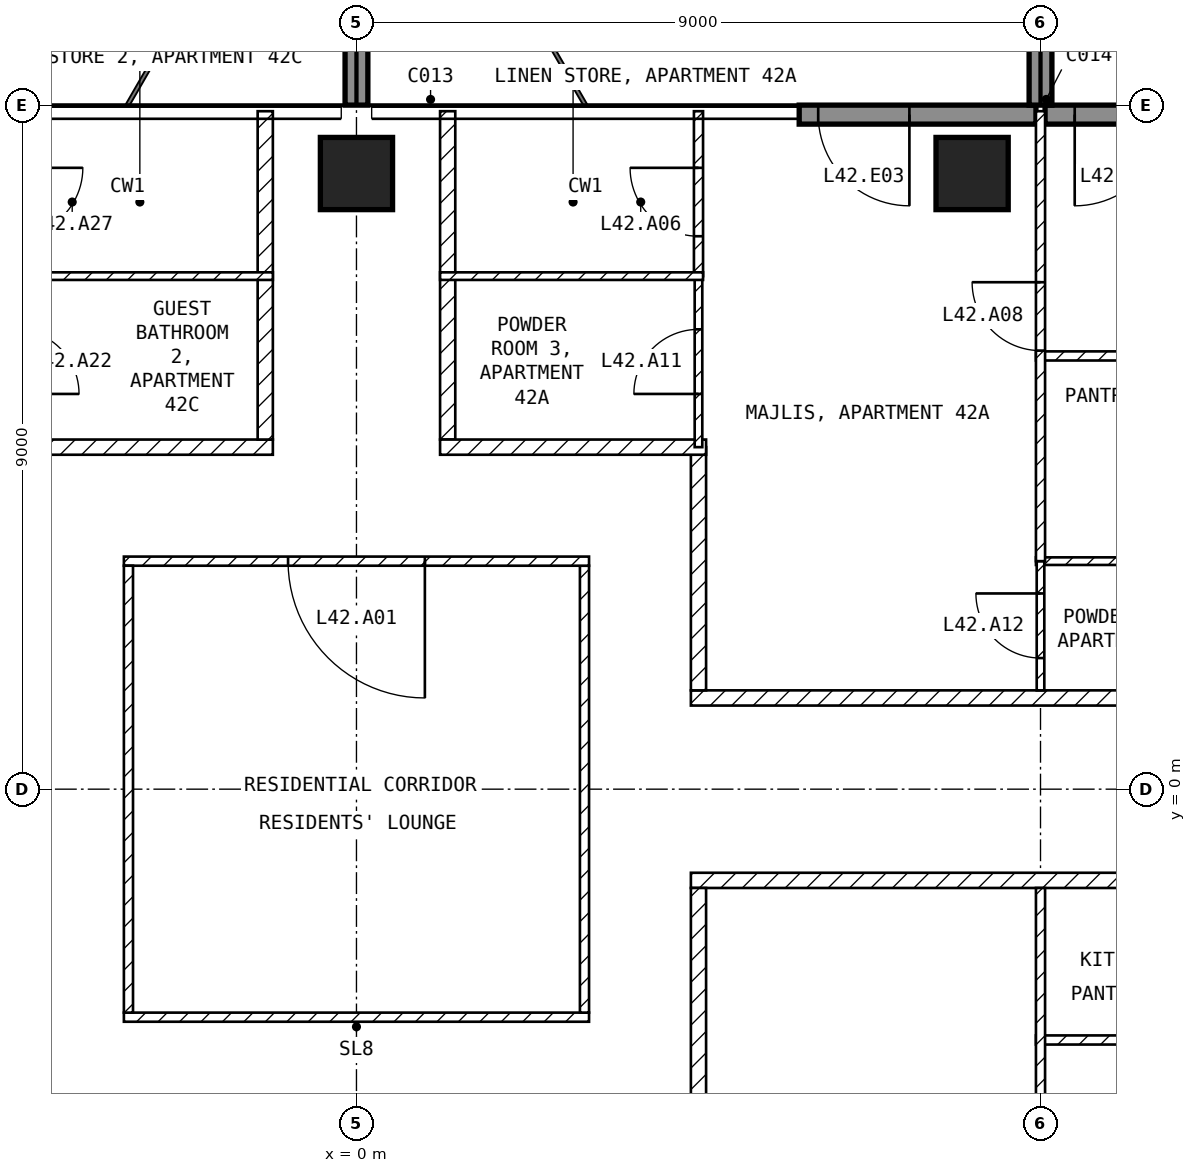
"""IFC4 building model, lengths in metres.
Left out: names, types, materials, properties, quantities, classifications, styles, units other than length and angle.
Written with IfcOpenShell. Run it as: python <this file> out.ifc"""

import sys

from ifc_helpers import new_model, si_unit, direction, frame, frame_2d, origin, origin_2d, place, context, subcontext, project, spatial, rectangle, extrude, element, fill, save


model = new_model("IFC4")
c1 = context("Model", 3, precision=1e-05, world=origin(), true_north=direction((0.0, 1.0)))
c2 = subcontext(c1, "Body", "Model", "MODEL_VIEW")
j1 = project(units=[si_unit("LENGTHUNIT", "METRE"), si_unit("PLANEANGLEUNIT", "RADIAN")], contexts=[c1])
p1 = place(None, origin())
s1 = spatial("IfcSite", under=j1, at=p1, CompositionType="ELEMENT")
p2 = place(p1, origin())
s2 = spatial("IfcBuilding", under=s1, at=p2, CompositionType="ELEMENT")
p3 = place(p2, frame((0.0, 0.0, 173.6)))
s3 = spatial("IfcBuildingStorey", under=s2, at=p3, CompositionType="ELEMENT", Elevation=173.6)
for number, where, z_axis, x_axis in (
    (1, (0.0, 8.1, -0.25), (0.0, 0.0, 1.0), (1.0, 0.0, 0.0)),
    (2, (8.1, 8.1, -0.25), (0.0, 0.0, 1.0), (1.0, 0.0, 0.0)),
):
    element("IfcColumn", number, at=place(p3, frame(where, z_axis=z_axis, x_axis=x_axis)), inside=s3, PredefinedType="COLUMN", context=c2, shape_type="SweptSolid", body=[
        extrude(rectangle(XDim=0.95, YDim=0.95, at=origin_2d()), origin(), (0.0, 0.0, 1.0), 3.5),
    ])
p4 = place(p3, frame((10.9, 8.875, 0.0), z_axis=(0.0, 0.0, 1.0), x_axis=(-1.0, 0.0, 0.0)))
e3 = element("IfcWall", 3, at=p4, inside=s3, PredefinedType="SOLIDWALL", context=c2, shape_type="SweptSolid", body=[
    extrude(rectangle(XDim=1.84, YDim=0.25, at=frame_2d((0.92, 0.0))), origin(), (0.0, 0.0, 1.0), 3.25),
])
p5 = place(p4, frame((0.25, 0.0, 0.0)))
e4 = element("IfcOpeningElement", 4, at=p5, cuts=e3, PredefinedType="OPENING", context=c2, shape_type="SweptSolid", body=[
    extrude(rectangle(XDim=1.2, YDim=2.4, at=frame_2d((0.6, 1.2))), frame((0.0, 0.135, 0.0), z_axis=(0.0, -1.0, 0.0), x_axis=(1.0, 0.0, 0.0)), (0.0, 0.0, 1.0), 0.27),
])
p6 = place(p3, frame((8.94, 8.875, 0.0), z_axis=(0.0, 0.0, 1.0), x_axis=(-1.0, 0.0, 0.0)))
e5 = element("IfcWall", 5, at=p6, inside=s3, PredefinedType="SOLIDWALL", context=c2, shape_type="SweptSolid", body=[
    extrude(rectangle(XDim=3.115, YDim=0.25, at=frame_2d((1.558, 0.0))), origin(), (0.0, 0.0, 1.0), 3.25),
])
p7 = place(p6, frame((1.665, 0.0, 0.0)))
e6 = element("IfcOpeningElement", 6, at=p7, cuts=e5, PredefinedType="OPENING", context=c2, shape_type="SweptSolid", body=[
    extrude(rectangle(XDim=1.2, YDim=2.4, at=frame_2d((0.6, 1.2))), frame((0.0, 0.135, 0.0), z_axis=(0.0, -1.0, 0.0), x_axis=(1.0, 0.0, 0.0)), (0.0, 0.0, 1.0), 0.27),
])
for number, where, z_axis, x_axis in (
    (7, (0.0, 9.0, 0.0), (0.0, 0.0, 1.0), (0.0, 1.0, 0.0)),
    (8, (9.0, 9.0, 0.0), (0.0, 0.0, 1.0), (0.0, 1.0, 0.0)),
):
    element("IfcWall", number, at=place(p3, frame(where, z_axis=z_axis, x_axis=x_axis)), inside=s3, PredefinedType="SOLIDWALL", context=c2, shape_type="SweptSolid", body=[
        extrude(rectangle(XDim=2.7, YDim=0.3, at=frame_2d((1.35, 0.0))), origin(), (0.0, 0.0, 1.0), 3.25),
    ])
p8 = place(p3, frame((-3.06, -3.0, 0.0), z_axis=(0.0, 0.0, 1.0), x_axis=(1.0, 0.0, 0.0)))
e9 = element("IfcWall", 9, at=p8, inside=s3, PredefinedType="PARTITIONING", context=c2, shape_type="SweptSolid", body=[
    extrude(rectangle(XDim=6.12, YDim=0.12, at=frame_2d((3.06, 0.0))), origin(), (0.0, 0.0, 1.0), 3.25),
])
p9 = place(p3, frame((3.0, -2.94, 0.0), z_axis=(0.0, 0.0, 1.0), x_axis=(0.0, 1.0, 0.0)))
e10 = element("IfcWall", 10, at=p9, inside=s3, PredefinedType="PARTITIONING", context=c2, shape_type="SweptSolid", body=[
    extrude(rectangle(XDim=5.88, YDim=0.12, at=frame_2d((2.94, 0.0))), origin(), (0.0, 0.0, 1.0), 3.25),
])
p10 = place(p3, frame((3.06, 3.0, 0.0), z_axis=(0.0, 0.0, 1.0), x_axis=(-1.0, 0.0, 0.0)))
e11 = element("IfcWall", 11, at=p10, inside=s3, PredefinedType="PARTITIONING", context=c2, shape_type="SweptSolid", body=[
    extrude(rectangle(XDim=6.12, YDim=0.12, at=frame_2d((3.06, 0.0))), origin(), (0.0, 0.0, 1.0), 3.25),
])
p11 = place(p10, frame((2.16, 0.0, 0.0)))
e12 = element("IfcOpeningElement", 12, at=p11, cuts=e11, PredefinedType="OPENING", context=c2, shape_type="SweptSolid", body=[
    extrude(rectangle(XDim=1.8, YDim=2.1, at=frame_2d((0.9, 1.05))), frame((0.0, 0.07, 0.0), z_axis=(0.0, -1.0, 0.0), x_axis=(1.0, 0.0, 0.0)), (0.0, 0.0, 1.0), 0.14),
])
p12 = place(p3, frame((-3.0, 2.94, 0.0), z_axis=(0.0, 0.0, 1.0), x_axis=(0.0, -1.0, 0.0)))
e13 = element("IfcWall", 13, at=p12, inside=s3, PredefinedType="PARTITIONING", context=c2, shape_type="SweptSolid", body=[
    extrude(rectangle(XDim=5.88, YDim=0.12, at=frame_2d((2.94, 0.0))), origin(), (0.0, 0.0, 1.0), 3.25),
])
p13 = place(p3, frame((4.4, 1.2, 0.0), z_axis=(0.0, 0.0, 1.0), x_axis=(1.0, 0.0, 0.0)))
e14 = element("IfcWall", 14, at=p13, inside=s3, PredefinedType="PARTITIONING", context=c2, shape_type="SweptSolid", body=[
    extrude(rectangle(XDim=17.2, YDim=0.2, at=frame_2d((8.6, 0.0))), origin(), (0.0, 0.0, 1.0), 3.25),
])
p14 = place(p13, frame((10.475, 0.0, 0.0)))
e15 = element("IfcOpeningElement", 15, at=p14, cuts=e14, PredefinedType="OPENING", context=c2, shape_type="SweptSolid", body=[
    extrude(rectangle(XDim=1.0, YDim=2.1, at=frame_2d((0.5, 1.05))), frame((0.0, 0.11, 0.0), z_axis=(0.0, -1.0, 0.0), x_axis=(1.0, 0.0, 0.0)), (0.0, 0.0, 1.0), 0.22),
])
p15 = place(p3, frame((4.5, 4.5, 0.0), z_axis=(0.0, 0.0, 1.0), x_axis=(0.0, -1.0, 0.0)))
e16 = element("IfcWall", 16, at=p15, inside=s3, PredefinedType="PARTITIONING", context=c2, shape_type="SweptSolid", body=[
    extrude(rectangle(XDim=3.2, YDim=0.2, at=frame_2d((1.6, 0.0))), origin(), (0.0, 0.0, 1.0), 3.25),
])
p16 = place(p3, frame((1.2, 8.92, 0.0), z_axis=(0.0, 0.0, 1.0), x_axis=(0.0, -1.0, 0.0)))
e17 = element("IfcWall", 17, at=p16, inside=s3, PredefinedType="PARTITIONING", context=c2, shape_type="SweptSolid", body=[
    extrude(rectangle(XDim=4.32, YDim=0.2, at=frame_2d((2.16, 0.0))), origin(), (0.0, 0.0, 1.0), 3.25),
])
p17 = place(p3, frame((1.1, 4.5, 0.0), z_axis=(0.0, 0.0, 1.0), x_axis=(1.0, 0.0, 0.0)))
e18 = element("IfcWall", 18, at=p17, inside=s3, PredefinedType="PARTITIONING", context=c2, shape_type="SweptSolid", body=[
    extrude(rectangle(XDim=3.5, YDim=0.2, at=frame_2d((1.75, 0.0))), origin(), (0.0, 0.0, 1.0), 3.25),
])
p18 = place(p3, frame((21.6, -1.2, 0.0), z_axis=(0.0, 0.0, 1.0), x_axis=(-1.0, 0.0, 0.0)))
e19 = element("IfcWall", 19, at=p18, inside=s3, PredefinedType="PARTITIONING", context=c2, shape_type="SweptSolid", body=[
    extrude(rectangle(XDim=17.2, YDim=0.2, at=frame_2d((8.6, 0.0))), origin(), (0.0, 0.0, 1.0), 3.25),
])
p19 = place(p18, frame((3.625, 0.0, 0.0)))
e20 = element("IfcOpeningElement", 20, at=p19, cuts=e19, PredefinedType="OPENING", context=c2, shape_type="SweptSolid", body=[
    extrude(rectangle(XDim=1.0, YDim=2.1, at=frame_2d((0.5, 1.05))), frame((0.0, 0.11, 0.0), z_axis=(0.0, -1.0, 0.0), x_axis=(1.0, 0.0, 0.0)), (0.0, 0.0, 1.0), 0.22),
])
p20 = place(p3, frame((4.5, -1.3, 0.0), z_axis=(0.0, 0.0, 1.0), x_axis=(0.0, -1.0, 0.0)))
e21 = element("IfcWall", 21, at=p20, inside=s3, PredefinedType="PARTITIONING", context=c2, shape_type="SweptSolid", body=[
    extrude(rectangle(XDim=3.2, YDim=0.2, at=frame_2d((1.6, 0.0))), origin(), (0.0, 0.0, 1.0), 3.25),
])
p21 = place(p3, frame((-4.6, 4.5, 0.0), z_axis=(0.0, 0.0, 1.0), x_axis=(1.0, 0.0, 0.0)))
e22 = element("IfcWall", 22, at=p21, inside=s3, PredefinedType="PARTITIONING", context=c2, shape_type="SweptSolid", body=[
    extrude(rectangle(XDim=3.5, YDim=0.2, at=frame_2d((1.75, 0.0))), origin(), (0.0, 0.0, 1.0), 3.25),
])
p22 = place(p3, frame((-1.2, 4.6, 0.0), z_axis=(0.0, 0.0, 1.0), x_axis=(0.0, 1.0, 0.0)))
e23 = element("IfcWall", 23, at=p22, inside=s3, PredefinedType="PARTITIONING", context=c2, shape_type="SweptSolid", body=[
    extrude(rectangle(XDim=4.32, YDim=0.2, at=frame_2d((2.16, 0.0))), origin(), (0.0, 0.0, 1.0), 3.25),
])
p23 = place(p3, frame((8.94, 3.0, 0.0), z_axis=(0.0, 0.0, 1.0), x_axis=(1.0, 0.0, 0.0)))
e24 = element("IfcWall", 24, at=p23, inside=s3, PredefinedType="PARTITIONING", context=c2, shape_type="SweptSolid", body=[
    extrude(rectangle(XDim=2.46, YDim=0.1, at=frame_2d((1.23, 0.0))), origin(), (0.0, 0.0, 1.0), 3.25),
])
p24 = place(p3, frame((9.0, 1.3, 0.0), z_axis=(0.0, 0.0, 1.0), x_axis=(0.0, 1.0, 0.0)))
e25 = element("IfcWall", 25, at=p24, inside=s3, PredefinedType="PARTITIONING", context=c2, shape_type="SweptSolid", body=[
    extrude(rectangle(XDim=1.7, YDim=0.1, at=frame_2d((0.85, 0.0))), origin(), (0.0, 0.0, 1.0), 3.25),
])
p25 = place(p24, frame((0.425, 0.0, 0.0)))
e26 = element("IfcOpeningElement", 26, at=p25, cuts=e25, PredefinedType="OPENING", context=c2, shape_type="SweptSolid", body=[
    extrude(rectangle(XDim=0.85, YDim=2.1, at=frame_2d((0.425, 1.05))), frame((0.0, 0.06, 0.0), z_axis=(0.0, -1.0, 0.0), x_axis=(1.0, 0.0, 0.0)), (0.0, 0.0, 1.0), 0.12),
])
p26 = place(p3, frame((12.36, 5.7, 0.0), z_axis=(0.0, 0.0, 1.0), x_axis=(-1.0, 0.0, 0.0)))
e27 = element("IfcWall", 27, at=p26, inside=s3, PredefinedType="PARTITIONING", context=c2, shape_type="SweptSolid", body=[
    extrude(rectangle(XDim=3.42, YDim=0.12, at=frame_2d((1.71, 0.0))), origin(), (0.0, 0.0, 1.0), 3.25),
])
p27 = place(p3, frame((9.0, 3.0, 0.0), z_axis=(0.0, 0.0, 1.0), x_axis=(0.0, 1.0, 0.0)))
e28 = element("IfcWall", 28, at=p27, inside=s3, PredefinedType="PARTITIONING", context=c2, shape_type="SweptSolid", body=[
    extrude(rectangle(XDim=5.92, YDim=0.12, at=frame_2d((2.96, 0.0))), origin(), (0.0, 0.0, 1.0), 3.25),
])
p28 = place(p27, frame((2.77, 0.0, 0.0)))
e29 = element("IfcOpeningElement", 29, at=p28, cuts=e28, PredefinedType="OPENING", context=c2, shape_type="SweptSolid", body=[
    extrude(rectangle(XDim=0.9, YDim=2.1, at=frame_2d((0.45, 1.05))), frame((0.0, 0.07, 0.0), z_axis=(0.0, -1.0, 0.0), x_axis=(1.0, 0.0, 0.0)), (0.0, 0.0, 1.0), 0.14),
])
p29 = place(p3, frame((4.5, 4.5, 0.0), z_axis=(0.0, 0.0, 1.0), x_axis=(0.0, 1.0, 0.0)))
e30 = element("IfcWall", 30, at=p29, inside=s3, PredefinedType="PARTITIONING", context=c2, shape_type="SweptSolid", body=[
    extrude(rectangle(XDim=2.25, YDim=0.1, at=frame_2d((1.125, 0.0))), origin(), (0.0, 0.0, 1.0), 3.25),
])
p30 = place(p29, frame((0.7, 0.0, 0.0)))
e31 = element("IfcOpeningElement", 31, at=p30, cuts=e30, PredefinedType="OPENING", context=c2, shape_type="SweptSolid", body=[
    extrude(rectangle(XDim=0.85, YDim=2.1, at=frame_2d((0.425, 1.05))), frame((0.0, 0.06, 0.0), z_axis=(0.0, -1.0, 0.0), x_axis=(1.0, 0.0, 0.0)), (0.0, 0.0, 1.0), 0.12),
])
p31 = place(p3, frame((4.5, 6.75, 0.0), z_axis=(0.0, 0.0, 1.0), x_axis=(0.0, 1.0, 0.0)))
e32 = element("IfcWall", 32, at=p31, inside=s3, PredefinedType="PARTITIONING", context=c2, shape_type="SweptSolid", body=[
    extrude(rectangle(XDim=2.17, YDim=0.12, at=frame_2d((1.085, 0.0))), origin(), (0.0, 0.0, 1.0), 3.25),
])
p32 = place(p31, frame((0.525, 0.0, 0.0)))
e33 = element("IfcOpeningElement", 33, at=p32, cuts=e32, PredefinedType="OPENING", context=c2, shape_type="SweptSolid", body=[
    extrude(rectangle(XDim=0.9, YDim=2.1, at=frame_2d((0.45, 1.05))), frame((0.0, 0.07, 0.0), z_axis=(0.0, -1.0, 0.0), x_axis=(1.0, 0.0, 0.0)), (0.0, 0.0, 1.0), 0.14),
])
p33 = place(p3, frame((1.1, 6.75, 0.0), z_axis=(0.0, 0.0, 1.0), x_axis=(1.0, 0.0, 0.0)))
e34 = element("IfcWall", 34, at=p33, inside=s3, PredefinedType="PARTITIONING", context=c2, shape_type="SweptSolid", body=[
    extrude(rectangle(XDim=3.46, YDim=0.1, at=frame_2d((1.73, 0.0))), origin(), (0.0, 0.0, 1.0), 3.25),
])
p34 = place(p3, frame((18.75, -3.3, 0.0), z_axis=(0.0, 0.0, 1.0), x_axis=(-1.0, 0.0, 0.0)))
e35 = element("IfcWall", 35, at=p34, inside=s3, PredefinedType="PARTITIONING", context=c2, shape_type="SweptSolid", body=[
    extrude(rectangle(XDim=9.81, YDim=0.12, at=frame_2d((4.905, 0.0))), origin(), (0.0, 0.0, 1.0), 3.25),
])
p35 = place(p34, frame((6.0, 0.0, 0.0)))
e36 = element("IfcOpeningElement", 36, at=p35, cuts=e35, PredefinedType="OPENING", context=c2, shape_type="SweptSolid", body=[
    extrude(rectangle(XDim=0.9, YDim=2.1, at=frame_2d((0.45, 1.05))), frame((0.0, 0.07, 0.0), z_axis=(0.0, -1.0, 0.0), x_axis=(1.0, 0.0, 0.0)), (0.0, 0.0, 1.0), 0.14),
])
p36 = place(p34, frame((1.2, 0.0, 0.0)))
e37 = element("IfcOpeningElement", 37, at=p36, cuts=e35, PredefinedType="OPENING", context=c2, shape_type="SweptSolid", body=[
    extrude(rectangle(XDim=0.9, YDim=2.1, at=frame_2d((0.45, 1.05))), frame((0.0, 0.07, 0.0), z_axis=(0.0, -1.0, 0.0), x_axis=(1.0, 0.0, 0.0)), (0.0, 0.0, 1.0), 0.14),
])
p37 = place(p3, frame((9.0, -8.92, 0.0), z_axis=(0.0, 0.0, 1.0), x_axis=(0.0, 1.0, 0.0)))
e38 = element("IfcWall", 38, at=p37, inside=s3, PredefinedType="PARTITIONING", context=c2, shape_type="SweptSolid", body=[
    extrude(rectangle(XDim=7.62, YDim=0.12, at=frame_2d((3.81, 0.0))), origin(), (0.0, 0.0, 1.0), 3.25),
])
p38 = place(p37, frame((2.42, 0.0, 0.0)))
e39 = element("IfcOpeningElement", 39, at=p38, cuts=e38, PredefinedType="OPENING", context=c2, shape_type="SweptSolid", body=[
    extrude(rectangle(XDim=0.9, YDim=2.1, at=frame_2d((0.45, 1.05))), frame((0.0, 0.07, 0.0), z_axis=(0.0, -1.0, 0.0), x_axis=(1.0, 0.0, 0.0)), (0.0, 0.0, 1.0), 0.14),
])
p39 = place(p3, frame((-4.56, 6.75, 0.0), z_axis=(0.0, 0.0, 1.0), x_axis=(1.0, 0.0, 0.0)))
e40 = element("IfcWall", 40, at=p39, inside=s3, PredefinedType="PARTITIONING", context=c2, shape_type="SweptSolid", body=[
    extrude(rectangle(XDim=3.46, YDim=0.1, at=frame_2d((1.73, 0.0))), origin(), (0.0, 0.0, 1.0), 3.25),
])
p40 = place(p5, origin())
e41 = element("IfcDoor", 41, at=p40, inside=s3, OperationType="SINGLE_SWING_RIGHT", PredefinedType="DOOR", context=c2, shape_type="SweptSolid", body=[
    extrude(rectangle(XDim=1.2, YDim=2.4, at=frame_2d((0.6, 1.2))), frame((0.0, 0.025, 0.0), z_axis=(0.0, -1.0, 0.0), x_axis=(1.0, 0.0, 0.0)), (0.0, 0.0, 1.0), 0.05),
])
fill(e4, e41)
p41 = place(p7, origin())
e42 = element("IfcDoor", 42, at=p41, inside=s3, OperationType="SINGLE_SWING_LEFT", PredefinedType="DOOR", context=c2, shape_type="SweptSolid", body=[
    extrude(rectangle(XDim=1.2, YDim=2.4, at=frame_2d((0.6, 1.2))), frame((0.0, 0.025, 0.0), z_axis=(0.0, -1.0, 0.0), x_axis=(1.0, 0.0, 0.0)), (0.0, 0.0, 1.0), 0.05),
])
fill(e6, e42)
p42 = place(p11, origin())
e43 = element("IfcDoor", 43, at=p42, inside=s3, OperationType="SINGLE_SWING_LEFT", PredefinedType="DOOR", context=c2, shape_type="SweptSolid", body=[
    extrude(rectangle(XDim=1.8, YDim=2.1, at=frame_2d((0.9, 1.05))), frame((0.0, 0.025, 0.0), z_axis=(0.0, -1.0, 0.0), x_axis=(1.0, 0.0, 0.0)), (0.0, 0.0, 1.0), 0.05),
])
fill(e12, e43)
p43 = place(p32, origin())
e44 = element("IfcDoor", 44, at=p43, inside=s3, OperationType="SINGLE_SWING_RIGHT", PredefinedType="DOOR", context=c2, shape_type="SweptSolid", body=[
    extrude(rectangle(XDim=0.9, YDim=2.1, at=frame_2d((0.45, 1.05))), frame((0.0, 0.025, 0.0), z_axis=(0.0, -1.0, 0.0), x_axis=(1.0, 0.0, 0.0)), (0.0, 0.0, 1.0), 0.05),
])
fill(e33, e44)
p44 = place(p28, origin())
e45 = element("IfcDoor", 45, at=p44, inside=s3, OperationType="SINGLE_SWING_RIGHT", PredefinedType="DOOR", context=c2, shape_type="SweptSolid", body=[
    extrude(rectangle(XDim=0.9, YDim=2.1, at=frame_2d((0.45, 1.05))), frame((0.0, 0.025, 0.0), z_axis=(0.0, -1.0, 0.0), x_axis=(1.0, 0.0, 0.0)), (0.0, 0.0, 1.0), 0.05),
])
fill(e29, e45)
p45 = place(p30, origin())
e46 = element("IfcDoor", 46, at=p45, inside=s3, OperationType="SINGLE_SWING_LEFT", PredefinedType="DOOR", context=c2, shape_type="SweptSolid", body=[
    extrude(rectangle(XDim=0.85, YDim=2.1, at=frame_2d((0.425, 1.05))), frame((0.0, 0.025, 0.0), z_axis=(0.0, -1.0, 0.0), x_axis=(1.0, 0.0, 0.0)), (0.0, 0.0, 1.0), 0.05),
])
fill(e31, e46)
p46 = place(p25, origin())
e47 = element("IfcDoor", 47, at=p46, inside=s3, OperationType="SINGLE_SWING_RIGHT", PredefinedType="DOOR", context=c2, shape_type="SweptSolid", body=[
    extrude(rectangle(XDim=0.85, YDim=2.1, at=frame_2d((0.425, 1.05))), frame((0.0, 0.025, 0.0), z_axis=(0.0, -1.0, 0.0), x_axis=(1.0, 0.0, 0.0)), (0.0, 0.0, 1.0), 0.05),
])
fill(e26, e47)
save(model, sys.argv[1])
